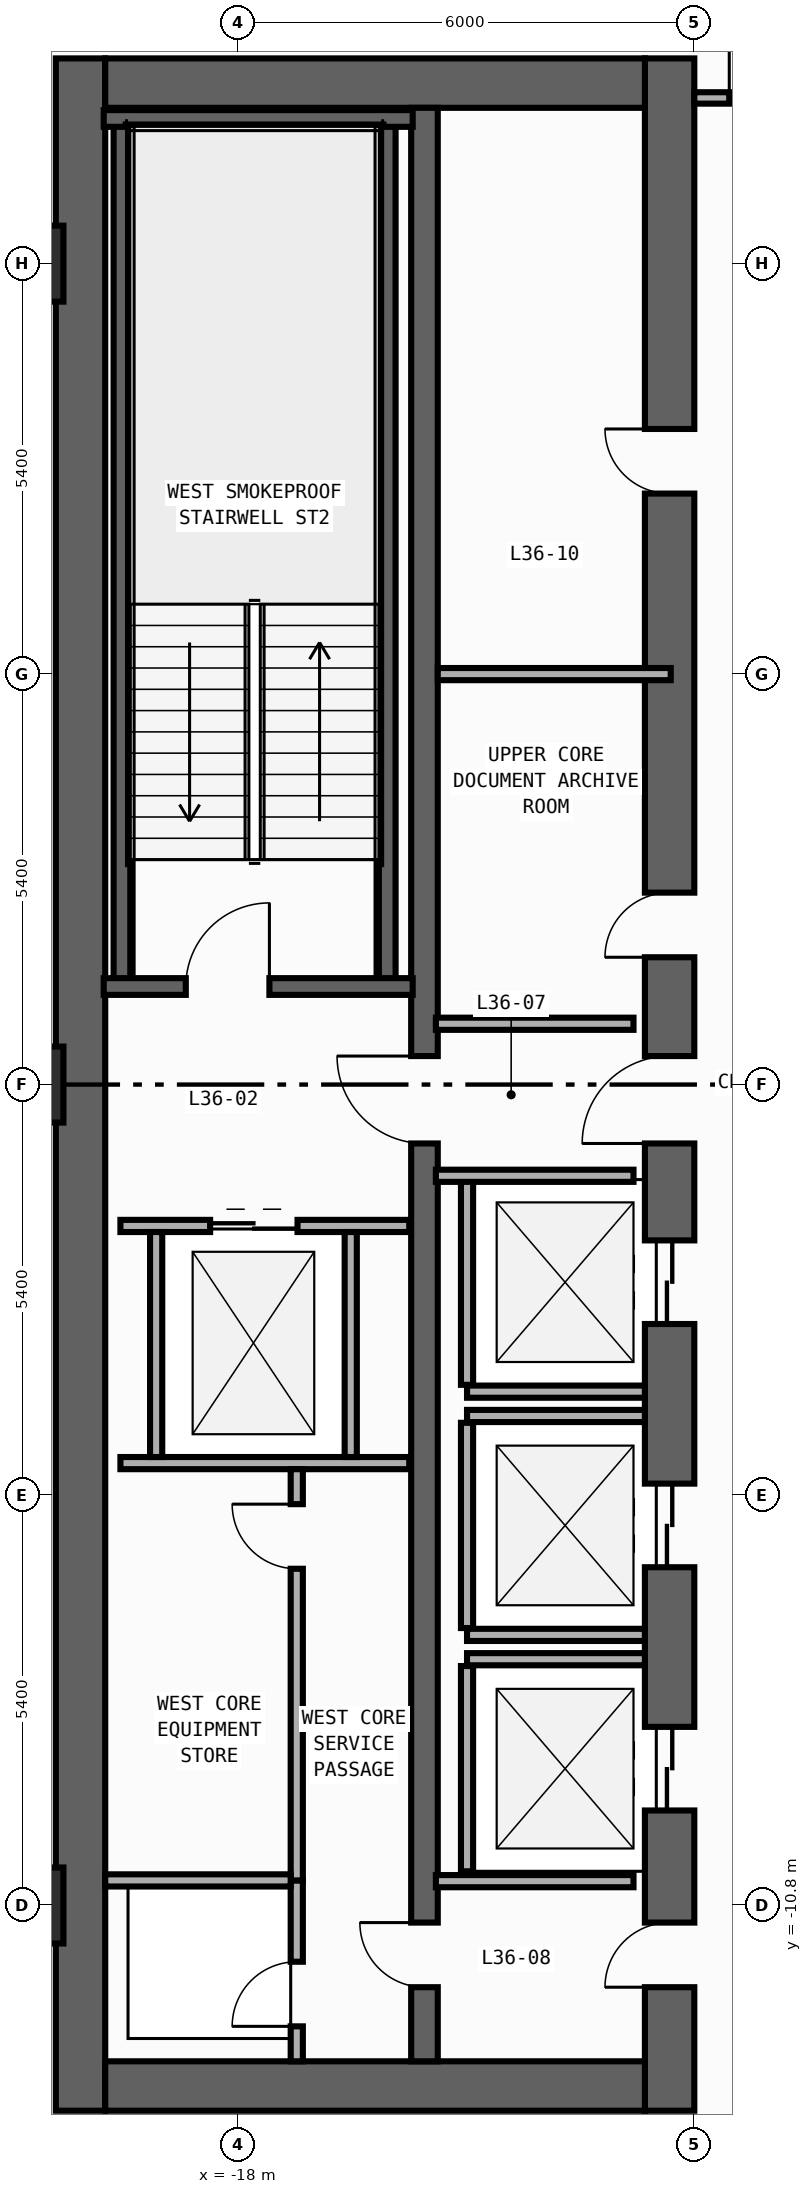
"""IFC4 building model, lengths in metres.
Left out: names, types, materials, properties, quantities, classifications, styles, units other than length and angle.
Written with IfcOpenShell. Run it as: python <this file> out.ifc"""

import sys

from ifc_helpers import new_model, si_unit, direction, frame, frame_2d, origin, origin_2d, place, context, subcontext, project, spatial, rectangle, extrude, element, fill, save


model = new_model("IFC4")
c1 = context("Model", 3, precision=1e-05, world=origin(), true_north=direction((0.0, 1.0)))
c2 = subcontext(c1, "Body", "Model", "MODEL_VIEW")
j1 = project(units=[si_unit("LENGTHUNIT", "METRE"), si_unit("PLANEANGLEUNIT", "RADIAN")], contexts=[c1])
p1 = place(None, origin())
s1 = spatial("IfcSite", under=j1, at=p1, CompositionType="ELEMENT")
p2 = place(p1, origin())
s2 = spatial("IfcBuilding", under=s1, at=p2, CompositionType="ELEMENT")
p3 = place(p2, frame((0.0, 0.0, 160.4)))
s3 = spatial("IfcBuildingStorey", under=s2, at=p3, CompositionType="ELEMENT", Elevation=160.4)
p4 = place(p3, frame((-20.075, -13.5, 0.0), z_axis=(0.0, 0.0, 1.0), x_axis=(0.0, 1.0, 0.0)))
e1 = element("IfcWall", 1, at=p4, inside=s3, PredefinedType="SHEAR", context=c2, shape_type="SweptSolid", body=[
    extrude(rectangle(XDim=27.0, YDim=0.65, at=frame_2d((13.5, 0.0))), origin(), (0.0, 0.0, 1.0), 4.34),
])
p5 = place(p3, frame((-12.325, -13.5, 0.0), z_axis=(0.0, 0.0, 1.0), x_axis=(0.0, 1.0, 0.0)))
e2 = element("IfcWall", 2, at=p5, inside=s3, PredefinedType="SHEAR", context=c2, shape_type="SweptSolid", body=[
    extrude(rectangle(XDim=27.0, YDim=0.65, at=frame_2d((13.5, 0.0))), origin(), (0.0, 0.0, 1.0), 4.34),
])
p6 = place(p5, frame((10.35, 0.0, 0.0)))
e3 = element("IfcOpeningElement", 3, at=p6, cuts=e2, PredefinedType="OPENING", context=c2, shape_type="SweptSolid", body=[
    extrude(rectangle(XDim=1.1, YDim=2.2, at=frame_2d((0.55, 1.1))), frame((0.0, 0.335, 0.0), z_axis=(0.0, -1.0, 0.0), x_axis=(1.0, 0.0, 0.0)), (0.0, 0.0, 1.0), 0.67),
])
p7 = place(p5, frame((7.15, 0.0, 0.0)))
e4 = element("IfcOpeningElement", 4, at=p7, cuts=e2, PredefinedType="OPENING", context=c2, shape_type="SweptSolid", body=[
    extrude(rectangle(XDim=1.1, YDim=2.2, at=frame_2d((0.55, 1.1))), frame((0.0, 0.335, 0.0), z_axis=(0.0, -1.0, 0.0), x_axis=(1.0, 0.0, 0.0)), (0.0, 0.0, 1.0), 0.67),
])
p8 = place(p5, frame((3.95, 0.0, 0.0)))
e5 = element("IfcOpeningElement", 5, at=p8, cuts=e2, PredefinedType="OPENING", context=c2, shape_type="SweptSolid", body=[
    extrude(rectangle(XDim=1.1, YDim=2.2, at=frame_2d((0.55, 1.1))), frame((0.0, 0.335, 0.0), z_axis=(0.0, -1.0, 0.0), x_axis=(1.0, 0.0, 0.0)), (0.0, 0.0, 1.0), 0.67),
])
p9 = place(p5, frame((15.175, 0.0, 0.0)))
e6 = element("IfcOpeningElement", 6, at=p9, cuts=e2, PredefinedType="OPENING", context=c2, shape_type="SweptSolid", body=[
    extrude(rectangle(XDim=0.85, YDim=2.1, at=frame_2d((0.425, 1.05))), frame((0.0, 0.335, 0.0), z_axis=(0.0, -1.0, 0.0), x_axis=(1.0, 0.0, 0.0)), (0.0, 0.0, 1.0), 0.67),
])
p10 = place(p5, frame((21.275, 0.0, 0.0)))
e7 = element("IfcOpeningElement", 7, at=p10, cuts=e2, PredefinedType="OPENING", context=c2, shape_type="SweptSolid", body=[
    extrude(rectangle(XDim=0.85, YDim=2.1, at=frame_2d((0.425, 1.05))), frame((0.0, 0.335, 0.0), z_axis=(0.0, -1.0, 0.0), x_axis=(1.0, 0.0, 0.0)), (0.0, 0.0, 1.0), 0.67),
])
p11 = place(p5, frame((12.725, 0.0, 0.0)))
e8 = element("IfcOpeningElement", 8, at=p11, cuts=e2, PredefinedType="OPENING", context=c2, shape_type="SweptSolid", body=[
    extrude(rectangle(XDim=1.15, YDim=2.2, at=frame_2d((0.575, 1.1))), frame((0.0, 0.335, 0.0), z_axis=(0.0, -1.0, 0.0), x_axis=(1.0, 0.0, 0.0)), (0.0, 0.0, 1.0), 0.67),
])
p12 = place(p5, frame((1.625, 0.0, 0.0)))
e9 = element("IfcOpeningElement", 9, at=p12, cuts=e2, PredefinedType="OPENING", context=c2, shape_type="SweptSolid", body=[
    extrude(rectangle(XDim=0.85, YDim=2.1, at=frame_2d((0.425, 1.05))), frame((0.0, 0.335, 0.0), z_axis=(0.0, -1.0, 0.0), x_axis=(1.0, 0.0, 0.0)), (0.0, 0.0, 1.0), 0.67),
])
for number, where, z_axis, x_axis in (
    (10, (-19.75, -13.175, 0.0), (0.0, 0.0, 1.0), (1.0, 0.0, 0.0)),
    (11, (-19.75, 13.175, 0.0), (0.0, 0.0, 1.0), (1.0, 0.0, 0.0)),
):
    element("IfcWall", number, at=place(p3, frame(where, z_axis=z_axis, x_axis=x_axis)), inside=s3, PredefinedType="SHEAR", context=c2, shape_type="SweptSolid", body=[
        extrude(rectangle(XDim=7.1, YDim=0.65, at=frame_2d((3.55, 0.0))), origin(), (0.0, 0.0, 1.0), 4.34),
    ])
p13 = place(p3, frame((-15.55, -12.85, 0.0), z_axis=(0.0, 0.0, 1.0), x_axis=(0.0, 1.0, 0.0)))
e12 = element("IfcWall", 12, at=p13, inside=s3, PredefinedType="SHEAR", context=c2, shape_type="SweptSolid", body=[
    extrude(rectangle(XDim=25.7, YDim=0.35, at=frame_2d((12.85, 0.0))), origin(), (0.0, 0.0, 1.0), 4.34),
])
p14 = place(p13, frame((12.075, 0.0, 0.0)))
e13 = element("IfcOpeningElement", 13, at=p14, cuts=e12, PredefinedType="OPENING", context=c2, shape_type="SweptSolid", body=[
    extrude(rectangle(XDim=1.15, YDim=2.2, at=frame_2d((0.575, 1.1))), frame((0.0, 0.185, 0.0), z_axis=(0.0, -1.0, 0.0), x_axis=(1.0, 0.0, 0.0)), (0.0, 0.0, 1.0), 0.37),
])
p15 = place(p13, frame((0.975, 0.0, 0.0)))
e14 = element("IfcOpeningElement", 14, at=p15, cuts=e12, PredefinedType="OPENING", context=c2, shape_type="SweptSolid", body=[
    extrude(rectangle(XDim=0.85, YDim=2.1, at=frame_2d((0.425, 1.05))), frame((0.0, 0.185, 0.0), z_axis=(0.0, -1.0, 0.0), x_axis=(1.0, 0.0, 0.0)), (0.0, 0.0, 1.0), 0.37),
])
for number, where, z_axis, x_axis in (
    (15, (-16.04, 1.29, 0.0), (0.0, 0.0, 1.0), (0.0, 1.0, 0.0)),
    (16, (-19.53, 1.29, 0.0), (0.0, 0.0, 1.0), (0.0, 1.0, 0.0)),
):
    element("IfcWall", number, at=place(p3, frame(where, z_axis=z_axis, x_axis=x_axis)), inside=s3, PredefinedType="SHEAR", context=c2, shape_type="SweptSolid", body=[
        extrude(rectangle(XDim=11.42, YDim=0.22, at=frame_2d((5.71, 0.0))), origin(), (0.0, 0.0, 1.0), 4.34),
    ])
p16 = place(p3, frame((-19.77, 12.71, 0.0), z_axis=(0.0, 0.0, 1.0), x_axis=(1.0, 0.0, 0.0)))
e17 = element("IfcWall", 17, at=p16, inside=s3, PredefinedType="SHEAR", context=c2, shape_type="SweptSolid", body=[
    extrude(rectangle(XDim=4.065, YDim=0.22, at=frame_2d((2.032, 0.0))), origin(), (0.0, 0.0, 1.0), 4.34),
])
p17 = place(p3, frame((-19.77, 1.29, 0.0), z_axis=(0.0, 0.0, 1.0), x_axis=(1.0, 0.0, 0.0)))
e18 = element("IfcWall", 18, at=p17, inside=s3, PredefinedType="SHEAR", context=c2, shape_type="SweptSolid", body=[
    extrude(rectangle(XDim=4.065, YDim=0.22, at=frame_2d((2.032, 0.0))), origin(), (0.0, 0.0, 1.0), 4.34),
])
p18 = place(p17, frame((1.08, 0.0, 0.0)))
e19 = element("IfcOpeningElement", 19, at=p18, cuts=e18, PredefinedType="OPENING", context=c2, shape_type="SweptSolid", body=[
    extrude(rectangle(XDim=1.1, YDim=2.2, at=frame_2d((0.55, 1.1))), frame((0.0, 0.12, 0.0), z_axis=(0.0, -1.0, 0.0), x_axis=(1.0, 0.0, 0.0)), (0.0, 0.0, 1.0), 0.24),
])
for number, where, z_axis, x_axis in (
    (20, (-20.8, -10.8, 0.0), (0.0, 0.0, 1.0), (1.0, 0.0, 0.0)),
    (21, (-20.8, 0.0, 0.0), (0.0, 0.0, 1.0), (1.0, 0.0, 0.0)),
    (22, (-20.8, 10.8, 0.0), (0.0, 0.0, 1.0), (1.0, 0.0, 0.0)),
):
    element("IfcColumn", number, at=place(p3, frame(where, z_axis=z_axis, x_axis=x_axis)), inside=s3, PredefinedType="COLUMN", context=c2, shape_type="SweptSolid", body=[
        extrude(rectangle(XDim=1.0, YDim=1.0, at=origin_2d()), origin(), (0.0, 0.0, 1.0), 4.6),
    ])
p19 = place(p3, frame((-14.99, -4.04, 0.0), z_axis=(0.0, 0.0, 1.0), x_axis=(1.0, 0.0, 0.0)))
e23 = element("IfcWall", 23, at=p19, inside=s3, PredefinedType="STANDARD", context=c2, shape_type="SweptSolid", body=[
    extrude(rectangle(XDim=2.34, YDim=0.16, at=frame_2d((1.17, 0.0))), origin(), (0.0, 0.0, 1.0), 4.34),
])
p20 = place(p3, frame((-14.99, -3.95, 0.0), z_axis=(0.0, 0.0, 1.0), x_axis=(0.0, 1.0, 0.0)))
e24 = element("IfcWall", 24, at=p20, inside=s3, PredefinedType="STANDARD", context=c2, shape_type="SweptSolid", body=[
    extrude(rectangle(XDim=2.7, YDim=0.16, at=frame_2d((1.35, 0.0))), origin(), (0.0, 0.0, 1.0), 4.34),
])
for number, where, z_axis, x_axis in (
    (25, (-14.99, -7.24, 0.0), (0.0, 0.0, 1.0), (1.0, 0.0, 0.0)),
    (26, (-14.99, -4.36, 0.0), (0.0, 0.0, 1.0), (1.0, 0.0, 0.0)),
):
    element("IfcWall", number, at=place(p3, frame(where, z_axis=z_axis, x_axis=x_axis)), inside=s3, PredefinedType="STANDARD", context=c2, shape_type="SweptSolid", body=[
        extrude(rectangle(XDim=2.34, YDim=0.16, at=frame_2d((1.17, 0.0))), origin(), (0.0, 0.0, 1.0), 4.34),
    ])
p21 = place(p3, frame((-14.99, -7.15, 0.0), z_axis=(0.0, 0.0, 1.0), x_axis=(0.0, 1.0, 0.0)))
e27 = element("IfcWall", 27, at=p21, inside=s3, PredefinedType="STANDARD", context=c2, shape_type="SweptSolid", body=[
    extrude(rectangle(XDim=2.7, YDim=0.16, at=frame_2d((1.35, 0.0))), origin(), (0.0, 0.0, 1.0), 4.34),
])
p22 = place(p3, frame((-14.99, -7.56, 0.0), z_axis=(0.0, 0.0, 1.0), x_axis=(1.0, 0.0, 0.0)))
e28 = element("IfcWall", 28, at=p22, inside=s3, PredefinedType="STANDARD", context=c2, shape_type="SweptSolid", body=[
    extrude(rectangle(XDim=2.34, YDim=0.16, at=frame_2d((1.17, 0.0))), origin(), (0.0, 0.0, 1.0), 4.34),
])
p23 = place(p3, frame((-14.99, -10.35, 0.0), z_axis=(0.0, 0.0, 1.0), x_axis=(0.0, 1.0, 0.0)))
e29 = element("IfcWall", 29, at=p23, inside=s3, PredefinedType="STANDARD", context=c2, shape_type="SweptSolid", body=[
    extrude(rectangle(XDim=2.7, YDim=0.16, at=frame_2d((1.35, 0.0))), origin(), (0.0, 0.0, 1.0), 4.34),
])
p24 = place(p3, frame((-19.55, -1.86, 0.0), z_axis=(0.0, 0.0, 1.0), x_axis=(1.0, 0.0, 0.0)))
e30 = element("IfcWall", 30, at=p24, inside=s3, PredefinedType="STANDARD", context=c2, shape_type="SweptSolid", body=[
    extrude(rectangle(XDim=3.8, YDim=0.16, at=frame_2d((1.9, 0.0))), origin(), (0.0, 0.0, 1.0), 4.34),
])
p25 = place(p24, frame((1.18, 0.0, 0.0)))
e31 = element("IfcOpeningElement", 31, at=p25, cuts=e30, PredefinedType="OPENING", context=c2, shape_type="SweptSolid", body=[
    extrude(rectangle(XDim=1.15, YDim=2.2, at=frame_2d((0.575, 1.1))), frame((0.0, 0.09, 0.0), z_axis=(0.0, -1.0, 0.0), x_axis=(1.0, 0.0, 0.0)), (0.0, 0.0, 1.0), 0.18),
])
p26 = place(p3, frame((-19.55, -4.98, 0.0), z_axis=(0.0, 0.0, 1.0), x_axis=(1.0, 0.0, 0.0)))
e32 = element("IfcWall", 32, at=p26, inside=s3, PredefinedType="STANDARD", context=c2, shape_type="SweptSolid", body=[
    extrude(rectangle(XDim=3.8, YDim=0.16, at=frame_2d((1.9, 0.0))), origin(), (0.0, 0.0, 1.0), 4.34),
])
for number, where, z_axis, x_axis in (
    (33, (-19.08, -4.9, 0.0), (0.0, 0.0, 1.0), (0.0, 1.0, 0.0)),
    (34, (-16.52, -4.9, 0.0), (0.0, 0.0, 1.0), (0.0, 1.0, 0.0)),
):
    element("IfcWall", number, at=place(p3, frame(where, z_axis=z_axis, x_axis=x_axis)), inside=s3, PredefinedType="STANDARD", context=c2, shape_type="SweptSolid", body=[
        extrude(rectangle(XDim=2.96, YDim=0.16, at=frame_2d((1.48, 0.0))), origin(), (0.0, 0.0, 1.0), 4.34),
    ])
for number, where, z_axis, x_axis in (
    (35, (-15.4, 0.8, 0.0), (0.0, 0.0, 1.0), (1.0, 0.0, 0.0)),
    (36, (-15.4, -1.2, 0.0), (0.0, 0.0, 1.0), (1.0, 0.0, 0.0)),
    (37, (-15.4, -10.48, 0.0), (0.0, 0.0, 1.0), (1.0, 0.0, 0.0)),
):
    element("IfcWall", number, at=place(p3, frame(where, z_axis=z_axis, x_axis=x_axis)), inside=s3, PredefinedType="STANDARD", context=c2, shape_type="SweptSolid", body=[
        extrude(rectangle(XDim=2.6, YDim=0.16, at=frame_2d((1.3, 0.0))), origin(), (0.0, 0.0, 1.0), 4.34),
    ])
p27 = place(p3, frame((-17.23, -12.85, 0.0), z_axis=(0.0, 0.0, 1.0), x_axis=(0.0, 1.0, 0.0)))
e38 = element("IfcWall", 38, at=p27, inside=s3, PredefinedType="PARTITIONING", context=c2, shape_type="SweptSolid", body=[
    extrude(rectangle(XDim=2.38, YDim=0.16, at=frame_2d((1.19, 0.0))), origin(), (0.0, 0.0, 1.0), 4.34),
])
p28 = place(p27, frame((0.46, 0.0, 0.0)))
e39 = element("IfcOpeningElement", 39, at=p28, cuts=e38, PredefinedType="OPENING", context=c2, shape_type="SweptSolid", body=[
    extrude(rectangle(XDim=0.85, YDim=2.1, at=frame_2d((0.425, 1.05))), frame((0.0, 0.09, 0.0), z_axis=(0.0, -1.0, 0.0), x_axis=(1.0, 0.0, 0.0)), (0.0, 0.0, 1.0), 0.18),
])
p29 = place(p3, frame((-17.23, -10.47, 0.0), z_axis=(0.0, 0.0, 1.0), x_axis=(0.0, 1.0, 0.0)))
e40 = element("IfcWall", 40, at=p29, inside=s3, PredefinedType="PARTITIONING", context=c2, shape_type="SweptSolid", body=[
    extrude(rectangle(XDim=5.41, YDim=0.16, at=frame_2d((2.705, 0.0))), origin(), (0.0, 0.0, 1.0), 4.34),
])
p30 = place(p29, frame((4.1, 0.0, 0.0)))
e41 = element("IfcOpeningElement", 41, at=p30, cuts=e40, PredefinedType="OPENING", context=c2, shape_type="SweptSolid", body=[
    extrude(rectangle(XDim=0.85, YDim=2.1, at=frame_2d((0.425, 1.05))), frame((0.0, 0.09, 0.0), z_axis=(0.0, -1.0, 0.0), x_axis=(1.0, 0.0, 0.0)), (0.0, 0.0, 1.0), 0.18),
])
p31 = place(p3, frame((-19.75, -10.47, 0.0), z_axis=(0.0, 0.0, 1.0), x_axis=(1.0, 0.0, 0.0)))
e42 = element("IfcWall", 42, at=p31, inside=s3, PredefinedType="PARTITIONING", context=c2, shape_type="SweptSolid", body=[
    extrude(rectangle(XDim=2.44, YDim=0.16, at=frame_2d((1.22, 0.0))), origin(), (0.0, 0.0, 1.0), 4.34),
])
p32 = place(p3, frame((-15.375, 5.4, 0.0), z_axis=(0.0, 0.0, 1.0), x_axis=(1.0, 0.0, 0.0)))
e43 = element("IfcWall", 43, at=p32, inside=s3, PredefinedType="PARTITIONING", context=c2, shape_type="SweptSolid", body=[
    extrude(rectangle(XDim=3.065, YDim=0.16, at=frame_2d((1.532, 0.0))), origin(), (0.0, 0.0, 1.0), 4.34),
])
p33 = place(p3, frame((-12.0, 12.98, 0.0), z_axis=(0.0, 0.0, 1.0), x_axis=(1.0, 0.0, 0.0)))
e44 = element("IfcWall", 44, at=p33, inside=s3, PredefinedType="PARTITIONING", context=c2, shape_type="SweptSolid", body=[
    extrude(rectangle(XDim=2.84, YDim=0.15, at=frame_2d((1.42, 0.0))), origin(), (0.0, 0.0, 1.0), 4.34),
])
p34 = place(p33, frame((0.46, 0.0, 0.0)))
e45 = element("IfcOpeningElement", 45, at=p34, cuts=e44, PredefinedType="OPENING", context=c2, shape_type="SweptSolid", body=[
    extrude(rectangle(XDim=0.9, YDim=2.15, at=frame_2d((0.45, 1.075))), frame((0.0, 0.085, 0.0), z_axis=(0.0, -1.0, 0.0), x_axis=(1.0, 0.0, 0.0)), (0.0, 0.0, 1.0), 0.17),
])
p35 = place(p18, origin())
e46 = element("IfcDoor", 46, at=p35, inside=s3, OperationType="SINGLE_SWING_RIGHT", PredefinedType="DOOR", context=c2, shape_type="SweptSolid", body=[
    extrude(rectangle(XDim=1.1, YDim=2.2, at=frame_2d((0.55, 1.1))), frame((0.0, 0.025, 0.0), z_axis=(0.0, -1.0, 0.0), x_axis=(1.0, 0.0, 0.0)), (0.0, 0.0, 1.0), 0.05),
])
fill(e19, e46)
p36 = place(p6, origin())
e47 = element("IfcDoor", 47, at=p36, inside=s3, OperationType="DOUBLE_DOOR_SLIDING", PredefinedType="DOOR", context=c2, shape_type="SweptSolid", body=[
    extrude(rectangle(XDim=1.1, YDim=2.2, at=frame_2d((0.55, 1.1))), frame((0.0, 0.025, 0.0), z_axis=(0.0, -1.0, 0.0), x_axis=(1.0, 0.0, 0.0)), (0.0, 0.0, 1.0), 0.05),
])
fill(e3, e47)
p37 = place(p7, origin())
e48 = element("IfcDoor", 48, at=p37, inside=s3, OperationType="DOUBLE_DOOR_SLIDING", PredefinedType="DOOR", context=c2, shape_type="SweptSolid", body=[
    extrude(rectangle(XDim=1.1, YDim=2.2, at=frame_2d((0.55, 1.1))), frame((0.0, 0.025, 0.0), z_axis=(0.0, -1.0, 0.0), x_axis=(1.0, 0.0, 0.0)), (0.0, 0.0, 1.0), 0.05),
])
fill(e4, e48)
p38 = place(p8, origin())
e49 = element("IfcDoor", 49, at=p38, inside=s3, OperationType="DOUBLE_DOOR_SLIDING", PredefinedType="DOOR", context=c2, shape_type="SweptSolid", body=[
    extrude(rectangle(XDim=1.1, YDim=2.2, at=frame_2d((0.55, 1.1))), frame((0.0, 0.025, 0.0), z_axis=(0.0, -1.0, 0.0), x_axis=(1.0, 0.0, 0.0)), (0.0, 0.0, 1.0), 0.05),
])
fill(e5, e49)
p39 = place(p9, origin())
e50 = element("IfcDoor", 50, at=p39, inside=s3, OperationType="SINGLE_SWING_LEFT", PredefinedType="DOOR", context=c2, shape_type="SweptSolid", body=[
    extrude(rectangle(XDim=0.85, YDim=2.1, at=frame_2d((0.425, 1.05))), frame((0.0, 0.025, 0.0), z_axis=(0.0, -1.0, 0.0), x_axis=(1.0, 0.0, 0.0)), (0.0, 0.0, 1.0), 0.05),
])
fill(e6, e50)
p40 = place(p10, origin())
e51 = element("IfcDoor", 51, at=p40, inside=s3, OperationType="SINGLE_SWING_RIGHT", PredefinedType="DOOR", context=c2, shape_type="SweptSolid", body=[
    extrude(rectangle(XDim=0.85, YDim=2.1, at=frame_2d((0.425, 1.05))), frame((0.0, 0.025, 0.0), z_axis=(0.0, -1.0, 0.0), x_axis=(1.0, 0.0, 0.0)), (0.0, 0.0, 1.0), 0.05),
])
fill(e7, e51)
p41 = place(p11, origin())
e52 = element("IfcDoor", 52, at=p41, inside=s3, OperationType="SINGLE_SWING_LEFT", PredefinedType="DOOR", context=c2, shape_type="SweptSolid", body=[
    extrude(rectangle(XDim=1.15, YDim=2.2, at=frame_2d((0.575, 1.1))), frame((0.0, 0.025, 0.0), z_axis=(0.0, -1.0, 0.0), x_axis=(1.0, 0.0, 0.0)), (0.0, 0.0, 1.0), 0.05),
])
fill(e8, e52)
p42 = place(p14, origin())
e53 = element("IfcDoor", 53, at=p42, inside=s3, OperationType="SINGLE_SWING_RIGHT", PredefinedType="DOOR", context=c2, shape_type="SweptSolid", body=[
    extrude(rectangle(XDim=1.15, YDim=2.2, at=frame_2d((0.575, 1.1))), frame((0.0, 0.025, 0.0), z_axis=(0.0, -1.0, 0.0), x_axis=(1.0, 0.0, 0.0)), (0.0, 0.0, 1.0), 0.05),
])
fill(e13, e53)
p43 = place(p12, origin())
e54 = element("IfcDoor", 54, at=p43, inside=s3, OperationType="SINGLE_SWING_LEFT", PredefinedType="DOOR", context=c2, shape_type="SweptSolid", body=[
    extrude(rectangle(XDim=0.85, YDim=2.1, at=frame_2d((0.425, 1.05))), frame((0.0, 0.025, 0.0), z_axis=(0.0, -1.0, 0.0), x_axis=(1.0, 0.0, 0.0)), (0.0, 0.0, 1.0), 0.05),
])
fill(e9, e54)
p44 = place(p15, origin())
e55 = element("IfcDoor", 55, at=p44, inside=s3, OperationType="SINGLE_SWING_RIGHT", PredefinedType="DOOR", context=c2, shape_type="SweptSolid", body=[
    extrude(rectangle(XDim=0.85, YDim=2.1, at=frame_2d((0.425, 1.05))), frame((0.0, 0.025, 0.0), z_axis=(0.0, -1.0, 0.0), x_axis=(1.0, 0.0, 0.0)), (0.0, 0.0, 1.0), 0.05),
])
fill(e14, e55)
p45 = place(p25, origin())
e56 = element("IfcDoor", 56, at=p45, inside=s3, OperationType="DOUBLE_DOOR_SLIDING", PredefinedType="DOOR", context=c2, shape_type="SweptSolid", body=[
    extrude(rectangle(XDim=1.15, YDim=2.2, at=frame_2d((0.575, 1.1))), frame((0.0, 0.025, 0.0), z_axis=(0.0, -1.0, 0.0), x_axis=(1.0, 0.0, 0.0)), (0.0, 0.0, 1.0), 0.05),
])
fill(e31, e56)
p46 = place(p28, origin())
e57 = element("IfcDoor", 57, at=p46, inside=s3, OperationType="SINGLE_SWING_LEFT", PredefinedType="DOOR", context=c2, shape_type="SweptSolid", body=[
    extrude(rectangle(XDim=0.85, YDim=2.1, at=frame_2d((0.425, 1.05))), frame((0.0, 0.025, 0.0), z_axis=(0.0, -1.0, 0.0), x_axis=(1.0, 0.0, 0.0)), (0.0, 0.0, 1.0), 0.05),
])
fill(e39, e57)
p47 = place(p30, origin())
e58 = element("IfcDoor", 58, at=p47, inside=s3, OperationType="SINGLE_SWING_RIGHT", PredefinedType="DOOR", context=c2, shape_type="SweptSolid", body=[
    extrude(rectangle(XDim=0.85, YDim=2.1, at=frame_2d((0.425, 1.05))), frame((0.0, 0.025, 0.0), z_axis=(0.0, -1.0, 0.0), x_axis=(1.0, 0.0, 0.0)), (0.0, 0.0, 1.0), 0.05),
])
fill(e41, e58)
p48 = place(p34, origin())
e59 = element("IfcDoor", 59, at=p48, inside=s3, OperationType="SINGLE_SWING_LEFT", PredefinedType="DOOR", context=c2, shape_type="SweptSolid", body=[
    extrude(rectangle(XDim=0.9, YDim=2.15, at=frame_2d((0.45, 1.075))), frame((0.0, 0.025, 0.0), z_axis=(0.0, -1.0, 0.0), x_axis=(1.0, 0.0, 0.0)), (0.0, 0.0, 1.0), 0.05),
])
fill(e45, e59)
save(model, sys.argv[1])
